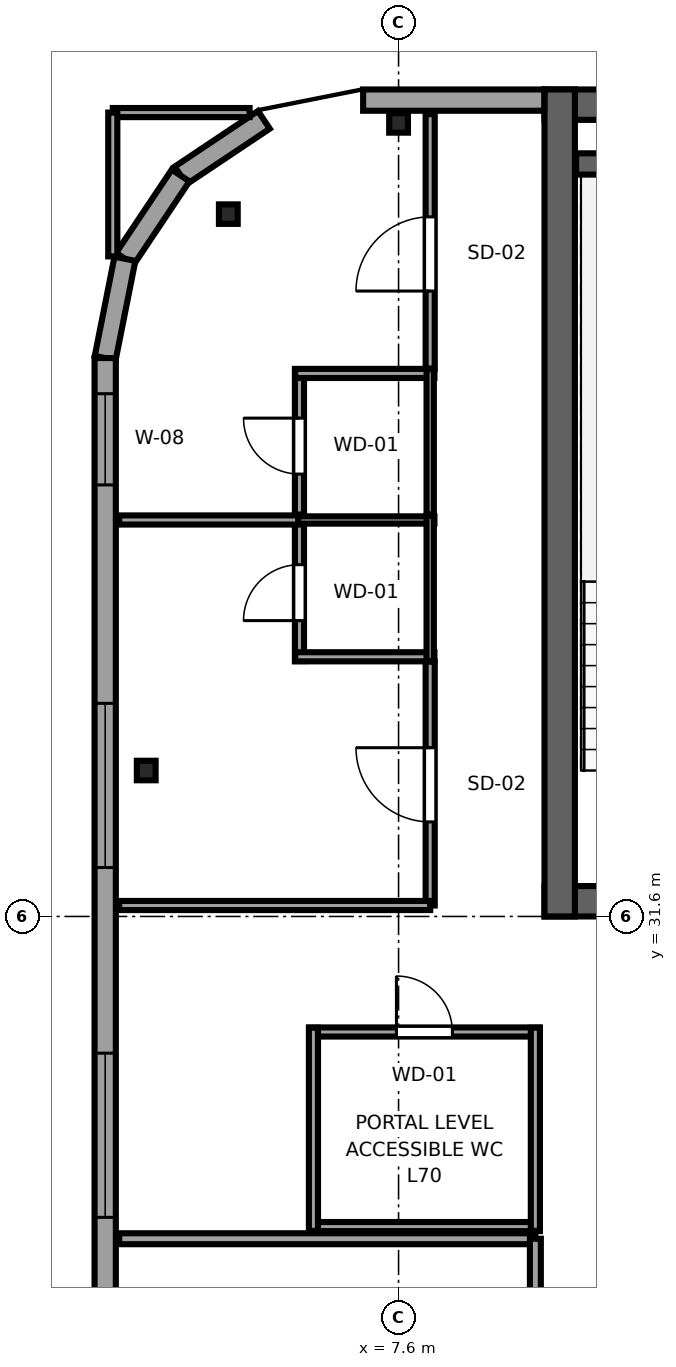
"""IFC4 building model, lengths in metres.
Left out: names, types, materials, properties, quantities, classifications, styles, units other than length and angle.
Written with IfcOpenShell. Run it as: python <this file> out.ifc"""

import sys

from ifc_helpers import new_model, si_unit, direction, frame, frame_2d, origin, origin_2d, place, context, subcontext, project, spatial, rectangle, i_section, extrude, source, transform, mapped, element, fill, save


model = new_model("IFC4")
c1 = context("Model", 3, precision=1e-05, world=origin(), true_north=direction((0.0, 1.0)))
c2 = subcontext(c1, "Body", "Model", "MODEL_VIEW")
j1 = project(units=[si_unit("LENGTHUNIT", "METRE"), si_unit("PLANEANGLEUNIT", "RADIAN")], contexts=[c1])
p1 = place(None, origin())
s1 = spatial("IfcSite", under=j1, at=p1, CompositionType="ELEMENT")
p2 = place(p1, origin())
s2 = spatial("IfcBuilding", under=s1, at=p2, CompositionType="ELEMENT")
p3 = place(p2, frame((0.0, 0.0, 262.95)))
s3 = spatial("IfcBuildingStorey", under=s2, at=p3, CompositionType="ELEMENT", Elevation=262.95)
p4 = place(p3, frame((10.0, 31.85, 0.0), z_axis=(0.0, 0.0, 1.0), x_axis=(1.0, 0.0, 0.0)))
e1 = element("IfcWall", 1, at=p4, inside=s3, PredefinedType="SHEAR", context=c2, shape_type="SweptSolid", body=[
    extrude(rectangle(XDim=26.0, YDim=0.5, at=frame_2d((13.0, 0.0))), origin(), (0.0, 0.0, 1.0), 3.55),
])
p5 = place(p4, frame((7.45, 0.0, 0.0), z_axis=(0.0, 0.0, 1.0), x_axis=(-1.0, 0.0, 0.0)))
e2 = element("IfcOpeningElement", 2, at=p5, cuts=e1, PredefinedType="OPENING", context=c2, shape_type="SweptSolid", body=[
    extrude(rectangle(XDim=1.5, YDim=2.04, at=frame_2d((0.75, 1.02))), frame((0.0, 0.26, 0.0), z_axis=(0.0, -1.0, 0.0), x_axis=(1.0, 0.0, 0.0)), (0.0, 0.0, 1.0), 0.52),
])
p6 = place(p4, frame((13.75, 0.0, 0.0), z_axis=(0.0, 0.0, 1.0), x_axis=(-1.0, 0.0, 0.0)))
e3 = element("IfcOpeningElement", 3, at=p6, cuts=e1, PredefinedType="OPENING", context=c2, shape_type="SweptSolid", body=[
    extrude(rectangle(XDim=1.5, YDim=2.04, at=frame_2d((0.75, 1.02))), frame((0.0, 0.26, 0.0), z_axis=(0.0, -1.0, 0.0), x_axis=(1.0, 0.0, 0.0)), (0.0, 0.0, 1.0), 0.52),
])
p7 = place(p4, frame((20.05, 0.0, 0.0), z_axis=(0.0, 0.0, 1.0), x_axis=(-1.0, 0.0, 0.0)))
e4 = element("IfcOpeningElement", 4, at=p7, cuts=e1, PredefinedType="OPENING", context=c2, shape_type="SweptSolid", body=[
    extrude(rectangle(XDim=1.5, YDim=2.04, at=frame_2d((0.75, 1.02))), frame((0.0, 0.26, 0.0), z_axis=(0.0, -1.0, 0.0), x_axis=(1.0, 0.0, 0.0)), (0.0, 0.0, 1.0), 0.52),
])
p8 = place(p3, frame((10.0, 44.95, 0.0), z_axis=(0.0, 0.0, 1.0), x_axis=(1.0, 0.0, 0.0)))
e5 = element("IfcWall", 5, at=p8, inside=s3, PredefinedType="SHEAR", context=c2, shape_type="SweptSolid", body=[
    extrude(rectangle(XDim=26.0, YDim=0.5, at=frame_2d((13.0, 0.0))), origin(), (0.0, 0.0, 1.0), 3.55),
])
p9 = place(p3, frame((10.25, 31.6, 0.0), z_axis=(0.0, 0.0, 1.0), x_axis=(0.0, 1.0, 0.0)))
e6 = element("IfcWall", 6, at=p9, inside=s3, PredefinedType="SHEAR", context=c2, shape_type="SweptSolid", body=[
    extrude(rectangle(XDim=13.6, YDim=0.5, at=frame_2d((6.8, 0.0))), origin(), (0.0, 0.0, 1.0), 3.55),
])
p10 = place(p3, frame((10.52, 43.975, 0.0), z_axis=(0.0, 0.0, 1.0), x_axis=(1.0, 0.0, 0.0)))
e7 = element("IfcWall", 7, at=p10, inside=s3, PredefinedType="SHEAR", context=c2, shape_type="SweptSolid", body=[
    extrude(rectangle(XDim=3.6, YDim=0.35, at=frame_2d((1.8, 0.0))), origin(), (0.0, 0.0, 1.0), 3.55),
])
m1 = source(origin(), c2, "Body", "SweptSolid", [
    extrude(i_section(OverallWidth=0.309, OverallDepth=0.321, WebThickness=0.014, FlangeThickness=0.022, FilletRadius=0.017, at=origin_2d()), origin(), (0.0, 0.0, 1.0), 3.55),
])
for number, where, z_axis, x_axis in (
    (8, (4.8, 43.15, 0.0), (0.0, 0.0, 1.0), (1.0, 0.0, 0.0)),
    (9, (7.6, 44.65, 0.0), (0.0, 0.0, 1.0), (1.0, 0.0, 0.0)),
    (10, (3.45, 34.0, 0.0), (0.0, 0.0, 1.0), (1.0, 0.0, 0.0)),
):
    element("IfcColumn", number, at=place(p3, frame(where, z_axis=z_axis, x_axis=x_axis)), inside=s3, PredefinedType="COLUMN", context=c2, shape_type="MappedRepresentation", body=[
        mapped(m1, transform((0.0, 0.0, 0.0), x_axis=(1.0, 0.0, 0.0), y_axis=(0.0, 1.0, 0.0), z_axis=(0.0, 0.0, 1.0), scale=1.0)),
    ])
p11 = place(p3, frame((9.996, 45.025, 0.0), z_axis=(0.0, 0.0, 1.0), x_axis=(-1.0, 0.0, 0.0)))
e11 = element("IfcWall", 11, at=p11, inside=s3, PredefinedType="SOLIDWALL", context=c2, shape_type="SweptSolid", body=[
    extrude(rectangle(XDim=2.979, YDim=0.35, at=frame_2d((1.49, 0.0))), origin(), (0.0, 0.0, 1.0), 2.16),
])
for number, where, z_axis, x_axis in (
    (12, (5.385, 44.7, 0.0), (0.0, 0.0, 1.0), (-0.832, -0.556, 0.0)),
    (13, (4.015, 43.785, 0.0), (0.0, 0.0, 1.0), (-0.556, -0.831, 0.0)),
):
    element("IfcWall", number, at=place(p3, frame(where, z_axis=z_axis, x_axis=x_axis)), inside=s3, PredefinedType="SOLIDWALL", context=c2, shape_type="SweptSolid", body=[
        extrude(rectangle(XDim=1.647, YDim=0.35, at=frame_2d((0.824, 0.0))), origin(), (0.0, 0.0, 1.0), 2.9),
    ])
p12 = place(p3, frame((3.1, 42.416, 0.0), z_axis=(0.0, 0.0, 1.0), x_axis=(-0.195044345786, -0.980794424524, 0.0)))
e14 = element("IfcWall", 14, at=p12, inside=s3, PredefinedType="SOLIDWALL", context=c2, shape_type="SweptSolid", body=[
    extrude(rectangle(XDim=1.665, YDim=0.35, at=frame_2d((0.833, 0.0))), origin(), (0.0, 0.0, 1.0), 3.37),
])
p13 = place(p3, frame((2.775, 40.783, 0.0), z_axis=(0.0, 0.0, 1.0), x_axis=(0.0, -1.0, 0.0)))
e15 = element("IfcWall", 15, at=p13, inside=s3, PredefinedType="SOLIDWALL", context=c2, shape_type="SweptSolid", body=[
    extrude(rectangle(XDim=33.766, YDim=0.35, at=frame_2d((16.883, 0.0))), origin(), (0.0, 0.0, 1.0), 3.37),
])
p14 = place(p13, frame((5.678, 0.0, 0.68)))
e16 = element("IfcOpeningElement", 16, at=p14, cuts=e15, PredefinedType="OPENING", context=c2, shape_type="SweptSolid", body=[
    extrude(rectangle(XDim=2.7, YDim=1.95, at=frame_2d((1.35, 0.975))), frame((0.0, 0.185, 0.0), z_axis=(0.0, -1.0, 0.0), x_axis=(1.0, 0.0, 0.0)), (0.0, 0.0, 1.0), 0.37),
])
p15 = place(p13, frame((11.431, 0.0, 0.68)))
e17 = element("IfcOpeningElement", 17, at=p15, cuts=e15, PredefinedType="OPENING", context=c2, shape_type="SweptSolid", body=[
    extrude(rectangle(XDim=2.7, YDim=1.95, at=frame_2d((1.35, 0.975))), frame((0.0, 0.185, 0.0), z_axis=(0.0, -1.0, 0.0), x_axis=(1.0, 0.0, 0.0)), (0.0, 0.0, 1.0), 0.37),
])
p16 = place(p13, frame((15.533, 0.0, 0.68)))
e18 = element("IfcOpeningElement", 18, at=p16, cuts=e15, PredefinedType="OPENING", context=c2, shape_type="SweptSolid", body=[
    extrude(rectangle(XDim=2.7, YDim=1.95, at=frame_2d((1.35, 0.975))), frame((0.0, 0.185, 0.0), z_axis=(0.0, -1.0, 0.0), x_axis=(1.0, 0.0, 0.0)), (0.0, 0.0, 1.0), 0.37),
])
p17 = place(p13, frame((19.635, 0.0, 0.68)))
e19 = element("IfcOpeningElement", 19, at=p17, cuts=e15, PredefinedType="OPENING", context=c2, shape_type="SweptSolid", body=[
    extrude(rectangle(XDim=2.7, YDim=1.95, at=frame_2d((1.35, 0.975))), frame((0.0, 0.185, 0.0), z_axis=(0.0, -1.0, 0.0), x_axis=(1.0, 0.0, 0.0)), (0.0, 0.0, 1.0), 0.37),
])
p18 = place(p13, frame((31.279, 0.0, 0.62)))
e20 = element("IfcOpeningElement", 20, at=p18, cuts=e15, PredefinedType="OPENING", context=c2, shape_type="SweptSolid", body=[
    extrude(rectangle(XDim=1.5, YDim=1.55, at=frame_2d((0.75, 0.775))), frame((0.0, 0.185, 0.0), z_axis=(0.0, -1.0, 0.0), x_axis=(1.0, 0.0, 0.0)), (0.0, 0.0, 1.0), 0.37),
])
p19 = place(p13, frame((27.783, 0.0, 0.62)))
e21 = element("IfcOpeningElement", 21, at=p19, cuts=e15, PredefinedType="OPENING", context=c2, shape_type="SweptSolid", body=[
    extrude(rectangle(XDim=1.5, YDim=1.55, at=frame_2d((0.75, 0.775))), frame((0.0, 0.185, 0.0), z_axis=(0.0, -1.0, 0.0), x_axis=(1.0, 0.0, 0.0)), (0.0, 0.0, 1.0), 0.37),
])
p20 = place(p13, frame((24.083, 0.0, 0.62)))
e22 = element("IfcOpeningElement", 22, at=p20, cuts=e15, PredefinedType="OPENING", context=c2, shape_type="SweptSolid", body=[
    extrude(rectangle(XDim=1.5, YDim=1.55, at=frame_2d((0.75, 0.775))), frame((0.0, 0.185, 0.0), z_axis=(0.0, -1.0, 0.0), x_axis=(1.0, 0.0, 0.0)), (0.0, 0.0, 1.0), 0.37),
])
p21 = place(p13, frame((0.586, 0.0, 0.62)))
e23 = element("IfcOpeningElement", 23, at=p21, cuts=e15, PredefinedType="OPENING", context=c2, shape_type="SweptSolid", body=[
    extrude(rectangle(XDim=1.5, YDim=1.55, at=frame_2d((0.75, 0.775))), frame((0.0, 0.185, 0.0), z_axis=(0.0, -1.0, 0.0), x_axis=(1.0, 0.0, 0.0)), (0.0, 0.0, 1.0), 0.37),
])
p22 = place(p3, frame((5.97, 35.8, 0.0), z_axis=(0.0, 0.0, 1.0), x_axis=(0.0, 1.0, 0.0)))
e24 = element("IfcWall", 24, at=p22, inside=s3, PredefinedType="PARTITIONING", context=c2, shape_type="SweptSolid", body=[
    extrude(rectangle(XDim=2.39, YDim=0.15, at=frame_2d((1.195, 0.0))), origin(), (0.0, 0.0, 1.0), 3.37),
])
p23 = place(p22, frame((0.665, 0.0, 0.0)))
e25 = element("IfcOpeningElement", 25, at=p23, cuts=e24, PredefinedType="OPENING", context=c2, shape_type="SweptSolid", body=[
    extrude(rectangle(XDim=0.92, YDim=2.01, at=frame_2d((0.46, 1.005))), frame((0.0, 0.085, 0.0), z_axis=(0.0, -1.0, 0.0), x_axis=(1.0, 0.0, 0.0)), (0.0, 0.0, 1.0), 0.17),
])
p24 = place(p3, frame((5.9, 35.87, 0.0), z_axis=(0.0, 0.0, 1.0), x_axis=(1.0, 0.0, 0.0)))
e26 = element("IfcWall", 26, at=p24, inside=s3, PredefinedType="PARTITIONING", context=c2, shape_type="SweptSolid", body=[
    extrude(rectangle(XDim=2.29, YDim=0.15, at=frame_2d((1.145, 0.0))), origin(), (0.0, 0.0, 1.0), 3.37),
])
p25 = place(p3, frame((5.9, 38.12, 0.0), z_axis=(0.0, 0.0, 1.0), x_axis=(1.0, 0.0, 0.0)))
e27 = element("IfcWall", 27, at=p25, inside=s3, PredefinedType="PLUMBINGWALL", context=c2, shape_type="SweptSolid", body=[
    extrude(rectangle(XDim=2.29, YDim=0.12, at=frame_2d((1.145, 0.0))), origin(), (0.0, 0.0, 1.0), 3.37),
])
p26 = place(p3, frame((8.12, 35.8, 0.0), z_axis=(0.0, 0.0, 1.0), x_axis=(0.0, 1.0, 0.0)))
e28 = element("IfcWall", 28, at=p26, inside=s3, PredefinedType="PLUMBINGWALL", context=c2, shape_type="SweptSolid", body=[
    extrude(rectangle(XDim=2.39, YDim=0.12, at=frame_2d((1.195, 0.0))), origin(), (0.0, 0.0, 1.0), 3.37),
])
p27 = place(p3, frame((5.97, 38.21, 0.0), z_axis=(0.0, 0.0, 1.0), x_axis=(0.0, 1.0, 0.0)))
e29 = element("IfcWall", 29, at=p27, inside=s3, PredefinedType="PARTITIONING", context=c2, shape_type="SweptSolid", body=[
    extrude(rectangle(XDim=2.39, YDim=0.15, at=frame_2d((1.195, 0.0))), origin(), (0.0, 0.0, 1.0), 3.37),
])
p28 = place(p27, frame((0.665, 0.0, 0.0)))
e30 = element("IfcOpeningElement", 30, at=p28, cuts=e29, PredefinedType="OPENING", context=c2, shape_type="SweptSolid", body=[
    extrude(rectangle(XDim=0.92, YDim=2.01, at=frame_2d((0.46, 1.005))), frame((0.0, 0.085, 0.0), z_axis=(0.0, -1.0, 0.0), x_axis=(1.0, 0.0, 0.0)), (0.0, 0.0, 1.0), 0.17),
])
p29 = place(p3, frame((5.9, 40.53, 0.0), z_axis=(0.0, 0.0, 1.0), x_axis=(1.0, 0.0, 0.0)))
e31 = element("IfcWall", 31, at=p29, inside=s3, PredefinedType="PARTITIONING", context=c2, shape_type="SweptSolid", body=[
    extrude(rectangle(XDim=2.29, YDim=0.15, at=frame_2d((1.145, 0.0))), origin(), (0.0, 0.0, 1.0), 3.37),
])
p30 = place(p3, frame((8.12, 38.21, 0.0), z_axis=(0.0, 0.0, 1.0), x_axis=(0.0, 1.0, 0.0)))
e32 = element("IfcWall", 32, at=p30, inside=s3, PredefinedType="PLUMBINGWALL", context=c2, shape_type="SweptSolid", body=[
    extrude(rectangle(XDim=2.39, YDim=0.12, at=frame_2d((1.195, 0.0))), origin(), (0.0, 0.0, 1.0), 3.37),
])
p31 = place(p3, frame((3.005, 26.3, 0.0), z_axis=(0.0, 0.0, 1.0), x_axis=(1.0, 0.0, 0.0)))
e33 = element("IfcWall", 33, at=p31, inside=s3, PredefinedType="PARTITIONING", context=c2, shape_type="SweptSolid", body=[
    extrude(rectangle(XDim=6.845, YDim=0.18, at=frame_2d((3.423, 0.0))), origin(), (0.0, 0.0, 1.0), 3.37),
])
p32 = place(p3, frame((9.85, 22.0, 0.0), z_axis=(0.0, 0.0, 1.0), x_axis=(0.0, 1.0, 0.0)))
e34 = element("IfcWall", 34, at=p32, inside=s3, PredefinedType="PARTITIONING", context=c2, shape_type="SweptSolid", body=[
    extrude(rectangle(XDim=4.3, YDim=0.18, at=frame_2d((2.15, 0.0))), origin(), (0.0, 0.0, 1.0), 3.37),
])
p33 = place(p32, frame((1.325, 0.0, 0.0)))
e35 = element("IfcOpeningElement", 35, at=p33, cuts=e34, PredefinedType="OPENING", context=c2, shape_type="SweptSolid", body=[
    extrude(rectangle(XDim=1.65, YDim=2.15, at=frame_2d((0.825, 1.075))), frame((0.0, 0.1, 0.0), z_axis=(0.0, -1.0, 0.0), x_axis=(1.0, 0.0, 0.0)), (0.0, 0.0, 1.0), 0.2),
])
p34 = place(p3, frame((6.13, 26.5, 0.0), z_axis=(0.0, 0.0, 1.0), x_axis=(1.0, 0.0, 0.0)))
e36 = element("IfcWall", 36, at=p34, inside=s3, PredefinedType="PARTITIONING", context=c2, shape_type="SweptSolid", body=[
    extrude(rectangle(XDim=3.79, YDim=0.15, at=frame_2d((1.895, 0.0))), origin(), (0.0, 0.0, 1.0), 3.37),
])
p35 = place(p3, frame((6.13, 29.7, 0.0), z_axis=(0.0, 0.0, 1.0), x_axis=(1.0, 0.0, 0.0)))
e37 = element("IfcWall", 37, at=p35, inside=s3, PredefinedType="PARTITIONING", context=c2, shape_type="SweptSolid", body=[
    extrude(rectangle(XDim=3.79, YDim=0.15, at=frame_2d((1.895, 0.0))), origin(), (0.0, 0.0, 1.0), 3.37),
])
p36 = place(p35, frame((1.435, 0.0, 0.0)))
e38 = element("IfcOpeningElement", 38, at=p36, cuts=e37, PredefinedType="OPENING", context=c2, shape_type="SweptSolid", body=[
    extrude(rectangle(XDim=0.92, YDim=2.01, at=frame_2d((0.46, 1.005))), frame((0.0, 0.085, 0.0), z_axis=(0.0, -1.0, 0.0), x_axis=(1.0, 0.0, 0.0)), (0.0, 0.0, 1.0), 0.17),
])
for number, where, z_axis, x_axis in (
    (39, (6.2, 26.43, 0.0), (0.0, 0.0, 1.0), (0.0, 1.0, 0.0)),
    (40, (9.85, 26.43, 0.0), (0.0, 0.0, 1.0), (0.0, 1.0, 0.0)),
):
    element("IfcWall", number, at=place(p3, frame(where, z_axis=z_axis, x_axis=x_axis)), inside=s3, PredefinedType="PARTITIONING", context=c2, shape_type="SweptSolid", body=[
        extrude(rectangle(XDim=3.34, YDim=0.15, at=frame_2d((1.67, 0.0))), origin(), (0.0, 0.0, 1.0), 3.37),
    ])
p37 = place(p3, frame((8.12, 31.78, 0.0), z_axis=(0.0, 0.0, 1.0), x_axis=(0.0, 1.0, 0.0)))
e41 = element("IfcWall", 41, at=p37, inside=s3, PredefinedType="PARTITIONING", context=c2, shape_type="SweptSolid", body=[
    extrude(rectangle(XDim=4.01, YDim=0.15, at=frame_2d((2.005, 0.0))), origin(), (0.0, 0.0, 1.0), 3.37),
])
p38 = place(p37, frame((1.375, 0.0, 0.0)))
e42 = element("IfcOpeningElement", 42, at=p38, cuts=e41, PredefinedType="OPENING", context=c2, shape_type="SweptSolid", body=[
    extrude(rectangle(XDim=1.22, YDim=2.08, at=frame_2d((0.61, 1.04))), frame((0.0, 0.085, 0.0), z_axis=(0.0, -1.0, 0.0), x_axis=(1.0, 0.0, 0.0)), (0.0, 0.0, 1.0), 0.17),
])
p39 = place(p3, frame((3.005, 31.78, 0.0), z_axis=(0.0, 0.0, 1.0), x_axis=(1.0, 0.0, 0.0)))
e43 = element("IfcWall", 43, at=p39, inside=s3, PredefinedType="PARTITIONING", context=c2, shape_type="SweptSolid", body=[
    extrude(rectangle(XDim=5.115, YDim=0.15, at=frame_2d((2.558, 0.0))), origin(), (0.0, 0.0, 1.0), 3.37),
])
p40 = place(p3, frame((3.005, 38.12, 0.0), z_axis=(0.0, 0.0, 1.0), x_axis=(1.0, 0.0, 0.0)))
e44 = element("IfcWall", 44, at=p40, inside=s3, PredefinedType="PARTITIONING", context=c2, shape_type="SweptSolid", body=[
    extrude(rectangle(XDim=2.945, YDim=0.15, at=frame_2d((1.473, 0.0))), origin(), (0.0, 0.0, 1.0), 3.37),
])
p41 = place(p3, frame((8.12, 40.61, 0.0), z_axis=(0.0, 0.0, 1.0), x_axis=(0.0, 1.0, 0.0)))
e45 = element("IfcWall", 45, at=p41, inside=s3, PredefinedType="PARTITIONING", context=c2, shape_type="SweptSolid", body=[
    extrude(rectangle(XDim=4.185, YDim=0.15, at=frame_2d((2.092, 0.0))), origin(), (0.0, 0.0, 1.0), 3.37),
])
p42 = place(p41, frame((1.275, 0.0, 0.0)))
e46 = element("IfcOpeningElement", 46, at=p42, cuts=e45, PredefinedType="OPENING", context=c2, shape_type="SweptSolid", body=[
    extrude(rectangle(XDim=1.22, YDim=2.08, at=frame_2d((0.61, 1.04))), frame((0.0, 0.085, 0.0), z_axis=(0.0, -1.0, 0.0), x_axis=(1.0, 0.0, 0.0)), (0.0, 0.0, 1.0), 0.17),
])
p43 = place(p3, frame((2.9, 44.82, 0.0), z_axis=(0.0, 0.0, 1.0), x_axis=(1.0, 0.0, 0.0)))
e47 = element("IfcWall", 47, at=p43, inside=s3, PredefinedType="PARTITIONING", context=c2, shape_type="SweptSolid", body=[
    extrude(rectangle(XDim=2.25, YDim=0.15, at=frame_2d((1.125, 0.0))), origin(), (0.0, 0.0, 1.0), 3.37),
])
p44 = place(p3, frame((2.9, 42.455, 0.0), z_axis=(0.0, 0.0, 1.0), x_axis=(0.0, 1.0, 0.0)))
e48 = element("IfcWall", 48, at=p44, inside=s3, PredefinedType="PARTITIONING", context=c2, shape_type="SweptSolid", body=[
    extrude(rectangle(XDim=2.365, YDim=0.15, at=frame_2d((1.183, 0.0))), origin(), (0.0, 0.0, 1.0), 3.37),
])
m2 = source(origin(), c2, "Body", "SweptSolid", [
    extrude(rectangle(XDim=2.7, YDim=1.95, at=frame_2d((1.35, 0.975))), frame((0.0, 0.09, 0.0), z_axis=(0.0, -1.0, 0.0), x_axis=(1.0, 0.0, 0.0)), (0.0, 0.0, 1.0), 0.06),
])
p45 = place(p14, origin())
e49 = element("IfcWindow", 49, at=p45, inside=s3, PartitioningType="TRIPLE_PANEL_HORIZONTAL", PredefinedType="WINDOW", context=c2, shape_type="MappedRepresentation", body=[
    mapped(m2, transform((0.0, 0.0, 0.0), x_axis=(1.0, 0.0, 0.0), y_axis=(0.0, 1.0, 0.0), z_axis=(0.0, 0.0, 1.0), scale=1.0)),
])
fill(e16, e49)
p46 = place(p15, origin())
e50 = element("IfcWindow", 50, at=p46, inside=s3, PartitioningType="TRIPLE_PANEL_HORIZONTAL", PredefinedType="WINDOW", context=c2, shape_type="MappedRepresentation", body=[
    mapped(m2, transform((0.0, 0.0, 0.0), x_axis=(1.0, 0.0, 0.0), y_axis=(0.0, 1.0, 0.0), z_axis=(0.0, 0.0, 1.0), scale=1.0)),
])
fill(e17, e50)
m3 = source(origin(), c2, "Body", "SweptSolid", [
    extrude(rectangle(XDim=1.5, YDim=1.55, at=frame_2d((0.75, 0.775))), frame((0.0, 0.09, 0.0), z_axis=(0.0, -1.0, 0.0), x_axis=(1.0, 0.0, 0.0)), (0.0, 0.0, 1.0), 0.06),
])
p47 = place(p21, origin())
e51 = element("IfcWindow", 51, at=p47, inside=s3, PartitioningType="SINGLE_PANEL", PredefinedType="WINDOW", context=c2, shape_type="MappedRepresentation", body=[
    mapped(m3, transform((0.0, 0.0, 0.0), x_axis=(1.0, 0.0, 0.0), y_axis=(0.0, 1.0, 0.0), z_axis=(0.0, 0.0, 1.0), scale=1.0)),
])
fill(e23, e51)
m4 = source(origin(), c2, "Body", "SweptSolid", [
    extrude(rectangle(XDim=0.92, YDim=2.01, at=frame_2d((0.46, 1.005))), frame((0.0, 0.025, 0.0), z_axis=(0.0, -1.0, 0.0), x_axis=(1.0, 0.0, 0.0)), (0.0, 0.0, 1.0), 0.05),
])
p48 = place(p23, origin())
e52 = element("IfcDoor", 52, at=p48, inside=s3, OperationType="SINGLE_SWING_LEFT", PredefinedType="DOOR", context=c2, shape_type="MappedRepresentation", body=[
    mapped(m4, transform((0.0, 0.0, 0.0), x_axis=(1.0, 0.0, 0.0), y_axis=(0.0, 1.0, 0.0), z_axis=(0.0, 0.0, 1.0), scale=1.0)),
])
fill(e25, e52)
p49 = place(p28, origin())
e53 = element("IfcDoor", 53, at=p49, inside=s3, OperationType="SINGLE_SWING_RIGHT", PredefinedType="DOOR", context=c2, shape_type="MappedRepresentation", body=[
    mapped(m4, transform((0.0, 0.0, 0.0), x_axis=(1.0, 0.0, 0.0), y_axis=(0.0, 1.0, 0.0), z_axis=(0.0, 0.0, 1.0), scale=1.0)),
])
fill(e30, e53)
p50 = place(p36, origin())
e54 = element("IfcDoor", 54, at=p50, inside=s3, OperationType="SINGLE_SWING_LEFT", PredefinedType="DOOR", context=c2, shape_type="MappedRepresentation", body=[
    mapped(m4, transform((0.0, 0.0, 0.0), x_axis=(1.0, 0.0, 0.0), y_axis=(0.0, 1.0, 0.0), z_axis=(0.0, 0.0, 1.0), scale=1.0)),
])
fill(e38, e54)
m5 = source(origin(), c2, "Body", "SweptSolid", [
    extrude(rectangle(XDim=1.22, YDim=2.08, at=frame_2d((0.61, 1.04))), frame((0.0, 0.025, 0.0), z_axis=(0.0, -1.0, 0.0), x_axis=(1.0, 0.0, 0.0)), (0.0, 0.0, 1.0), 0.05),
])
p51 = place(p38, origin())
e55 = element("IfcDoor", 55, at=p51, inside=s3, OperationType="SINGLE_SWING_RIGHT", PredefinedType="DOOR", context=c2, shape_type="MappedRepresentation", body=[
    mapped(m5, transform((0.0, 0.0, 0.0), x_axis=(1.0, 0.0, 0.0), y_axis=(0.0, 1.0, 0.0), z_axis=(0.0, 0.0, 1.0), scale=1.0)),
])
fill(e42, e55)
p52 = place(p42, origin())
e56 = element("IfcDoor", 56, at=p52, inside=s3, OperationType="SINGLE_SWING_LEFT", PredefinedType="DOOR", context=c2, shape_type="MappedRepresentation", body=[
    mapped(m5, transform((0.0, 0.0, 0.0), x_axis=(1.0, 0.0, 0.0), y_axis=(0.0, 1.0, 0.0), z_axis=(0.0, 0.0, 1.0), scale=1.0)),
])
fill(e46, e56)
save(model, sys.argv[1])
